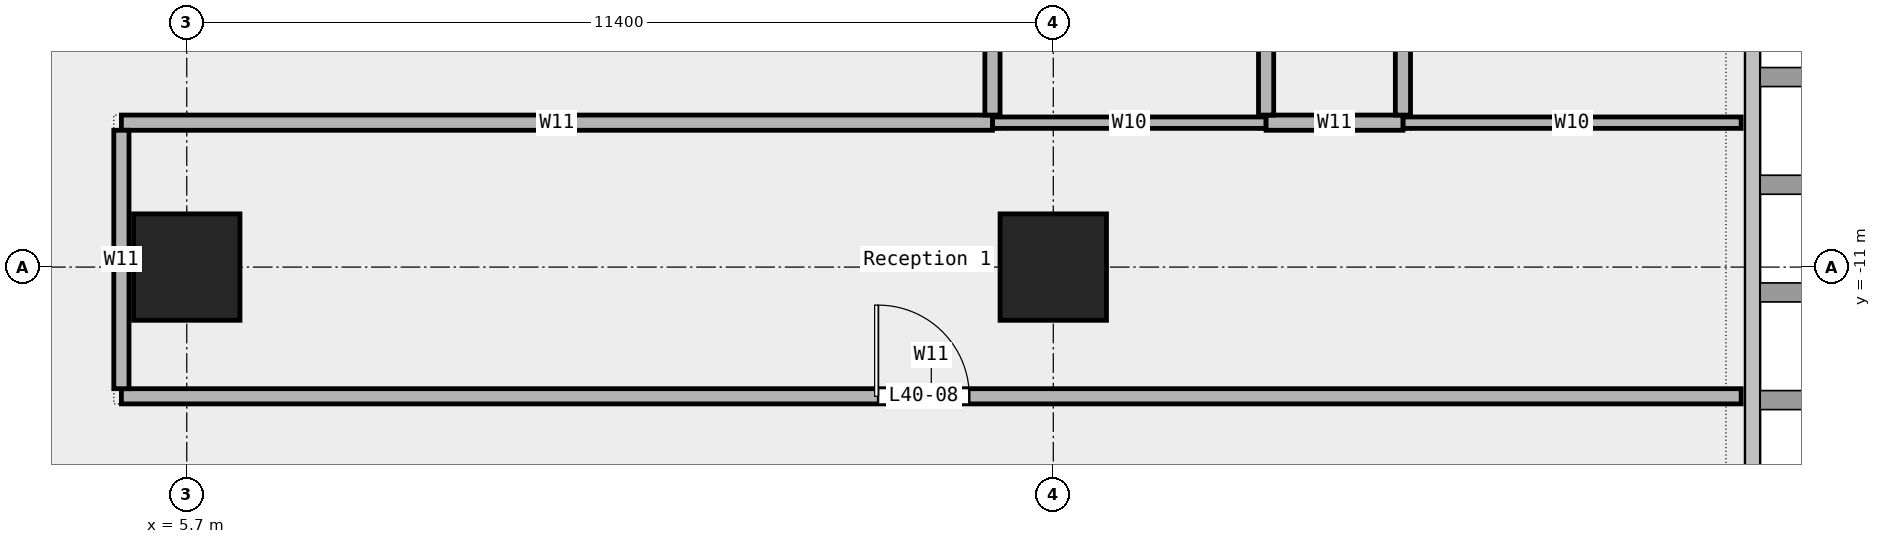
"""IFC4 building model, lengths in metres.
Left out: names, types, materials, properties, quantities, classifications, styles, units other than length and angle.
Written with IfcOpenShell. Run it as: python <this file> out.ifc"""

import sys

from ifc_helpers import new_model, si_unit, direction, frame, frame_2d, origin, origin_2d, place, context, subcontext, project, spatial, rectangle, extrude, element, fill, save


model = new_model("IFC4")
c1 = context("Model", 3, precision=1e-05, world=origin(), true_north=direction((0.0, 1.0)))
c2 = subcontext(c1, "Body", "Model", "MODEL_VIEW")
j1 = project(units=[si_unit("LENGTHUNIT", "METRE"), si_unit("PLANEANGLEUNIT", "RADIAN")], contexts=[c1])
p1 = place(None, origin())
s1 = spatial("IfcSite", under=j1, at=p1, CompositionType="ELEMENT")
p2 = place(p1, origin())
s2 = spatial("IfcBuilding", under=s1, at=p2, CompositionType="ELEMENT")
p3 = place(p2, frame((0.0, 0.0, 193.0)))
s3 = spatial("IfcBuildingStorey", under=s2, at=p3, CompositionType="ELEMENT", Elevation=193.0)
for number, where, z_axis, x_axis in (
    (1, (5.7, -11.0, 0.0), (0.0, 0.0, 1.0), (1.0, 0.0, 0.0)),
    (2, (17.1, -11.0, 0.0), (0.0, 0.0, 1.0), (1.0, 0.0, 0.0)),
):
    element("IfcColumn", number, at=place(p3, frame(where, z_axis=z_axis, x_axis=x_axis)), inside=s3, PredefinedType="COLUMN", context=c2, shape_type="SweptSolid", body=[
        extrude(rectangle(XDim=1.4, YDim=1.4, at=origin_2d()), origin(), (0.0, 0.0, 1.0), 3.6),
    ])
p4 = place(p3, frame((4.84, -12.7, 0.0), z_axis=(0.0, 0.0, 1.0), x_axis=(1.0, 0.0, 0.0)))
e3 = element("IfcWall", 3, at=p4, inside=s3, PredefinedType="PARTITIONING", context=c2, shape_type="SweptSolid", body=[
    extrude(rectangle(XDim=21.31, YDim=0.2, at=frame_2d((10.655, 0.0))), origin(), (0.0, 0.0, 1.0), 3.6),
])
p5 = place(p4, frame((9.955, 0.0, 0.0)))
e4 = element("IfcOpeningElement", 4, at=p5, cuts=e3, PredefinedType="OPENING", context=c2, shape_type="SweptSolid", body=[
    extrude(rectangle(XDim=1.2, YDim=2.1, at=frame_2d((0.6, 1.05))), frame((0.0, 0.112, 0.0), z_axis=(0.0, -1.0, 0.0), x_axis=(1.0, 0.0, 0.0)), (0.0, 0.0, 1.0), 0.224),
])
p6 = place(p3, frame((16.3, -9.1, 0.0), z_axis=(0.0, 0.0, 1.0), x_axis=(1.0, 0.0, 0.0)))
e5 = element("IfcWall", 5, at=p6, inside=s3, PredefinedType="PARTITIONING", context=c2, shape_type="SweptSolid", body=[
    extrude(rectangle(XDim=3.6, YDim=0.15, at=frame_2d((1.8, 0.0))), origin(), (0.0, 0.0, 1.0), 3.6),
])
p7 = place(p3, frame((21.7, -9.1, 0.0), z_axis=(0.0, 0.0, 1.0), x_axis=(1.0, 0.0, 0.0)))
e6 = element("IfcWall", 6, at=p7, inside=s3, PredefinedType="PARTITIONING", context=c2, shape_type="SweptSolid", body=[
    extrude(rectangle(XDim=4.45, YDim=0.15, at=frame_2d((2.225, 0.0))), origin(), (0.0, 0.0, 1.0), 3.6),
])
p8 = place(p3, frame((4.84, -9.1, 0.0), z_axis=(0.0, 0.0, 1.0), x_axis=(1.0, 0.0, 0.0)))
e7 = element("IfcWall", 7, at=p8, inside=s3, PredefinedType="PARTITIONING", context=c2, shape_type="SweptSolid", body=[
    extrude(rectangle(XDim=11.46, YDim=0.2, at=frame_2d((5.73, 0.0))), origin(), (0.0, 0.0, 1.0), 3.6),
])
p9 = place(p3, frame((19.9, -9.1, 0.0), z_axis=(0.0, 0.0, 1.0), x_axis=(1.0, 0.0, 0.0)))
e8 = element("IfcWall", 8, at=p9, inside=s3, PredefinedType="PARTITIONING", context=c2, shape_type="SweptSolid", body=[
    extrude(rectangle(XDim=1.8, YDim=0.2, at=frame_2d((0.9, 0.0))), origin(), (0.0, 0.0, 1.0), 3.6),
])
p10 = place(p3, frame((4.84, -12.6, 0.0), z_axis=(0.0, 0.0, 1.0), x_axis=(0.0, 1.0, 0.0)))
e9 = element("IfcWall", 9, at=p10, inside=s3, PredefinedType="PARTITIONING", context=c2, shape_type="SweptSolid", body=[
    extrude(rectangle(XDim=3.4, YDim=0.2, at=frame_2d((1.7, 0.0))), origin(), (0.0, 0.0, 1.0), 3.6),
])
p11 = place(p3, frame((16.3, -9.0, 0.0), z_axis=(0.0, 0.0, 1.0), x_axis=(0.0, 1.0, 0.0)))
e10 = element("IfcWall", 10, at=p11, inside=s3, PredefinedType="PARTITIONING", context=c2, shape_type="SweptSolid", body=[
    extrude(rectangle(XDim=8.3, YDim=0.2, at=frame_2d((4.15, 0.0))), origin(), (0.0, 0.0, 1.0), 3.6),
])
p12 = place(p3, frame((19.9, -9.0, 0.0), z_axis=(0.0, 0.0, 1.0), x_axis=(0.0, 1.0, 0.0)))
e11 = element("IfcWall", 11, at=p12, inside=s3, PredefinedType="PARTITIONING", context=c2, shape_type="SweptSolid", body=[
    extrude(rectangle(XDim=11.15, YDim=0.2, at=frame_2d((5.575, 0.0))), origin(), (0.0, 0.0, 1.0), 3.6),
])
p13 = place(p12, frame((5.125, 0.0, 0.0)))
e12 = element("IfcOpeningElement", 12, at=p13, cuts=e11, PredefinedType="OPENING", context=c2, shape_type="SweptSolid", body=[
    extrude(rectangle(XDim=0.9, YDim=2.1, at=frame_2d((0.45, 1.05))), frame((0.0, 0.112, 0.0), z_axis=(0.0, -1.0, 0.0), x_axis=(1.0, 0.0, 0.0)), (0.0, 0.0, 1.0), 0.224),
])
p14 = place(p3, frame((21.7, -9.0, 0.0), z_axis=(0.0, 0.0, 1.0), x_axis=(0.0, 1.0, 0.0)))
e13 = element("IfcWall", 13, at=p14, inside=s3, PredefinedType="PARTITIONING", context=c2, shape_type="SweptSolid", body=[
    extrude(rectangle(XDim=24.3, YDim=0.2, at=frame_2d((12.15, 0.0))), origin(), (0.0, 0.0, 1.0), 3.6),
])
p15 = place(p14, frame((4.795, 0.0, 0.0)))
e14 = element("IfcOpeningElement", 14, at=p15, cuts=e13, PredefinedType="OPENING", context=c2, shape_type="SweptSolid", body=[
    extrude(rectangle(XDim=1.2, YDim=2.1, at=frame_2d((0.6, 1.05))), frame((0.0, 0.112, 0.0), z_axis=(0.0, -1.0, 0.0), x_axis=(1.0, 0.0, 0.0)), (0.0, 0.0, 1.0), 0.224),
])
p16 = place(p14, frame((16.795, 0.0, 0.0)))
e15 = element("IfcOpeningElement", 15, at=p16, cuts=e13, PredefinedType="OPENING", context=c2, shape_type="SweptSolid", body=[
    extrude(rectangle(XDim=1.5, YDim=2.1, at=frame_2d((0.75, 1.05))), frame((0.0, 0.112, 0.0), z_axis=(0.0, -1.0, 0.0), x_axis=(1.0, 0.0, 0.0)), (0.0, 0.0, 1.0), 0.224),
])
p17 = place(p5, origin())
e16 = element("IfcDoor", 16, at=p17, inside=s3, OperationType="SINGLE_SWING_LEFT", PredefinedType="DOOR", context=c2, shape_type="SweptSolid", body=[
    extrude(rectangle(XDim=1.2, YDim=2.1, at=frame_2d((0.6, 1.05))), frame((0.0, 0.025, 0.0), z_axis=(0.0, -1.0, 0.0), x_axis=(1.0, 0.0, 0.0)), (0.0, 0.0, 1.0), 0.05),
])
fill(e4, e16)
save(model, sys.argv[1])
